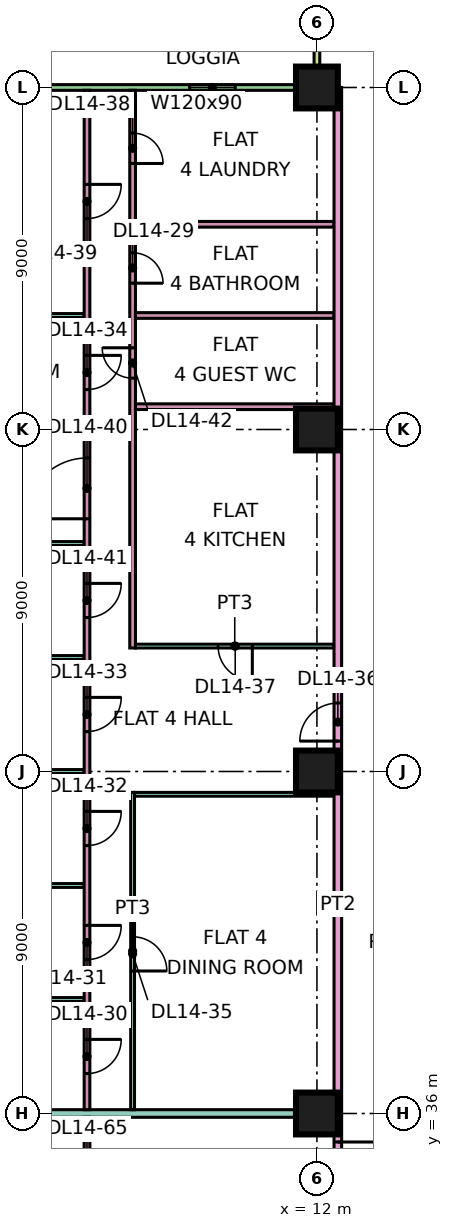
"""IFC4 building model, lengths in metres.
Left out: names, types, materials, properties, quantities, classifications, styles, units other than length and angle.
Written with IfcOpenShell. Run it as: python <this file> out.ifc"""

import sys

from ifc_helpers import new_model, si_unit, direction, frame, frame_2d, origin, origin_2d, place, context, subcontext, project, spatial, rectangle, extrude, element, fill, save


model = new_model("IFC4")
c1 = context("Model", 3, precision=1e-05, world=origin(), true_north=direction((0.0, 1.0)))
c2 = subcontext(c1, "Body", "Model", "MODEL_VIEW")
j1 = project(units=[si_unit("LENGTHUNIT", "METRE"), si_unit("PLANEANGLEUNIT", "RADIAN")], contexts=[c1])
p1 = place(None, origin())
s1 = spatial("IfcSite", under=j1, at=p1, CompositionType="ELEMENT")
p2 = place(p1, origin())
s2 = spatial("IfcBuilding", under=s1, at=p2, CompositionType="ELEMENT")
p3 = place(p2, frame((0.0, 0.0, 67.65)))
s3 = spatial("IfcBuildingStorey", under=s2, at=p3, CompositionType="ELEMENT", Elevation=67.65)
for number, where, z_axis, x_axis in (
    (1, (12.0, 36.0, 0.0), (0.0, 0.0, 1.0), (1.0, 0.0, 0.0)),
    (2, (12.0, 45.0, 0.0), (0.0, 0.0, 1.0), (1.0, 0.0, 0.0)),
    (3, (12.0, 54.0, 0.0), (0.0, 0.0, 1.0), (1.0, 0.0, 0.0)),
    (4, (12.0, 63.0, 0.0), (0.0, 0.0, 1.0), (1.0, 0.0, 0.0)),
):
    element("IfcColumn", number, at=place(p3, frame(where, z_axis=z_axis, x_axis=x_axis)), inside=s3, PredefinedType="COLUMN", context=c2, shape_type="SweptSolid", body=[
        extrude(rectangle(XDim=1.1, YDim=1.1, at=origin_2d()), origin(), (0.0, 0.0, 1.0), 3.75),
    ])
p4 = place(p3, frame((11.925, 63.0, 0.0), z_axis=(0.0, 0.0, 1.0), x_axis=(-1.0, 0.0, 0.0)))
e5 = element("IfcWall", 5, at=p4, inside=s3, PredefinedType="SOLIDWALL", context=c2, shape_type="SweptSolid", body=[
    extrude(rectangle(XDim=10.35, YDim=0.15, at=frame_2d((5.175, 0.0))), origin(), (0.0, 0.0, 1.0), 3.35),
])
p5 = place(p4, frame((2.075, 0.0, 1.7)))
e6 = element("IfcOpeningElement", 6, at=p5, cuts=e5, PredefinedType="OPENING", context=c2, shape_type="SweptSolid", body=[
    extrude(rectangle(XDim=1.2, YDim=0.9, at=frame_2d((0.6, 0.45))), frame((0.0, 0.085, 0.0), z_axis=(0.0, -1.0, 0.0), x_axis=(1.0, 0.0, 0.0)), (0.0, 0.0, 1.0), 0.17),
])
p6 = place(p4, frame((7.262, 0.0, 0.0)))
e7 = element("IfcOpeningElement", 7, at=p6, cuts=e5, PredefinedType="OPENING", context=c2, shape_type="SweptSolid", body=[
    extrude(rectangle(XDim=1.8, YDim=2.4, at=frame_2d((0.9, 1.2))), frame((0.0, 0.085, 0.0), z_axis=(0.0, -1.0, 0.0), x_axis=(1.0, 0.0, 0.0)), (0.0, 0.0, 1.0), 0.17),
])
p7 = place(p3, frame((12.0, 64.5, 0.0), z_axis=(0.0, 0.0, 1.0), x_axis=(0.0, -1.0, 0.0)))
e8 = element("IfcWall", 8, at=p7, inside=s3, PredefinedType="SOLIDWALL", context=c2, shape_type="SweptSolid", body=[
    extrude(rectangle(XDim=1.5, YDim=0.15, at=frame_2d((0.75, 0.0))), origin(), (0.0, 0.0, 1.0), 3.35),
])
for number, where, z_axis, x_axis in (
    (9, (-1.351, 39.0, 0.0), (0.0, 0.0, 1.0), (1.0, 0.0, 0.0)),
    (10, (-1.351, 42.0, 0.0), (0.0, 0.0, 1.0), (1.0, 0.0, 0.0)),
    (11, (-1.351, 45.0, 0.0), (0.0, 0.0, 1.0), (1.0, 0.0, 0.0)),
):
    element("IfcWall", number, at=place(p3, frame(where, z_axis=z_axis, x_axis=x_axis)), inside=s3, PredefinedType="PARTITIONING", context=c2, shape_type="SweptSolid", body=[
        extrude(rectangle(XDim=7.226, YDim=0.1, at=frame_2d((3.613, 0.0))), origin(), (0.0, 0.0, 1.0), 3.35),
    ])
p8 = place(p3, frame((0.0, 36.0, 0.0), z_axis=(0.0, 0.0, 1.0), x_axis=(1.0, 0.0, 0.0)))
e12 = element("IfcWall", 12, at=p8, inside=s3, PredefinedType="PARTITIONING", context=c2, shape_type="SweptSolid", body=[
    extrude(rectangle(XDim=12.45, YDim=0.2, at=frame_2d((6.225, 0.0))), origin(), (0.0, 0.0, 1.0), 3.35),
])
p9 = place(p3, frame((0.0, 48.0, 0.0), z_axis=(0.0, 0.0, 1.0), x_axis=(1.0, 0.0, 0.0)))
e13 = element("IfcWall", 13, at=p9, inside=s3, PredefinedType="PARTITIONING", context=c2, shape_type="SweptSolid", body=[
    extrude(rectangle(XDim=5.875, YDim=0.1, at=frame_2d((2.938, 0.0))), origin(), (0.0, 0.0, 1.0), 3.35),
])
for number, where, z_axis, x_axis in (
    (14, (0.074, 51.0, 0.0), (0.0, 0.0, 1.0), (1.0, 0.0, 0.0)),
    (15, (0.074, 54.0, 0.0), (0.0, 0.0, 1.0), (1.0, 0.0, 0.0)),
    (16, (0.074, 57.0, 0.0), (0.0, 0.0, 1.0), (1.0, 0.0, 0.0)),
):
    element("IfcWall", number, at=place(p3, frame(where, z_axis=z_axis, x_axis=x_axis)), inside=s3, PredefinedType="PARTITIONING", context=c2, shape_type="SweptSolid", body=[
        extrude(rectangle(XDim=5.801, YDim=0.1, at=frame_2d((2.9, 0.0))), origin(), (0.0, 0.0, 1.0), 3.35),
    ])
p10 = place(p3, frame((5.95, 29.925, 0.0), z_axis=(0.0, 0.0, 1.0), x_axis=(0.0, 1.0, 0.0)))
e17 = element("IfcWall", 17, at=p10, inside=s3, PredefinedType="PARTITIONING", context=c2, shape_type="SweptSolid", body=[
    extrude(rectangle(XDim=5.975, YDim=0.15, at=frame_2d((2.987, 0.0))), origin(), (0.0, 0.0, 1.0), 3.35),
])
p11 = place(p10, frame((4.125, 0.0, 0.0)))
e18 = element("IfcOpeningElement", 18, at=p11, cuts=e17, PredefinedType="OPENING", context=c2, shape_type="SweptSolid", body=[
    extrude(rectangle(XDim=0.9, YDim=2.1, at=frame_2d((0.45, 1.05))), frame((0.0, 0.085, 0.0), z_axis=(0.0, -1.0, 0.0), x_axis=(1.0, 0.0, 0.0)), (0.0, 0.0, 1.0), 0.17),
])
p12 = place(p3, frame((5.95, 36.1, 0.0), z_axis=(0.0, 0.0, 1.0), x_axis=(0.0, 1.0, 0.0)))
e19 = element("IfcWall", 19, at=p12, inside=s3, PredefinedType="PARTITIONING", context=c2, shape_type="SweptSolid", body=[
    extrude(rectangle(XDim=26.826, YDim=0.15, at=frame_2d((13.413, 0.0))), origin(), (0.0, 0.0, 1.0), 3.35),
])
p13 = place(p12, frame((0.95, 0.0, 0.0)))
e20 = element("IfcOpeningElement", 20, at=p13, cuts=e19, PredefinedType="OPENING", context=c2, shape_type="SweptSolid", body=[
    extrude(rectangle(XDim=0.9, YDim=2.1, at=frame_2d((0.45, 1.05))), frame((0.0, 0.085, 0.0), z_axis=(0.0, -1.0, 0.0), x_axis=(1.0, 0.0, 0.0)), (0.0, 0.0, 1.0), 0.17),
])
p14 = place(p12, frame((3.95, 0.0, 0.0)))
e21 = element("IfcOpeningElement", 21, at=p14, cuts=e19, PredefinedType="OPENING", context=c2, shape_type="SweptSolid", body=[
    extrude(rectangle(XDim=0.9, YDim=2.1, at=frame_2d((0.45, 1.05))), frame((0.0, 0.085, 0.0), z_axis=(0.0, -1.0, 0.0), x_axis=(1.0, 0.0, 0.0)), (0.0, 0.0, 1.0), 0.17),
])
p15 = place(p12, frame((6.95, 0.0, 0.0)))
e22 = element("IfcOpeningElement", 22, at=p15, cuts=e19, PredefinedType="OPENING", context=c2, shape_type="SweptSolid", body=[
    extrude(rectangle(XDim=0.9, YDim=2.1, at=frame_2d((0.45, 1.05))), frame((0.0, 0.085, 0.0), z_axis=(0.0, -1.0, 0.0), x_axis=(1.0, 0.0, 0.0)), (0.0, 0.0, 1.0), 0.17),
])
p16 = place(p12, frame((9.95, 0.0, 0.0)))
e23 = element("IfcOpeningElement", 23, at=p16, cuts=e19, PredefinedType="OPENING", context=c2, shape_type="SweptSolid", body=[
    extrude(rectangle(XDim=0.9, YDim=2.1, at=frame_2d((0.45, 1.05))), frame((0.0, 0.085, 0.0), z_axis=(0.0, -1.0, 0.0), x_axis=(1.0, 0.0, 0.0)), (0.0, 0.0, 1.0), 0.17),
])
p17 = place(p12, frame((18.95, 0.0, 0.0)))
e24 = element("IfcOpeningElement", 24, at=p17, cuts=e19, PredefinedType="OPENING", context=c2, shape_type="SweptSolid", body=[
    extrude(rectangle(XDim=0.9, YDim=2.1, at=frame_2d((0.45, 1.05))), frame((0.0, 0.085, 0.0), z_axis=(0.0, -1.0, 0.0), x_axis=(1.0, 0.0, 0.0)), (0.0, 0.0, 1.0), 0.17),
])
p18 = place(p12, frame((23.45, 0.0, 0.0)))
e25 = element("IfcOpeningElement", 25, at=p18, cuts=e19, PredefinedType="OPENING", context=c2, shape_type="SweptSolid", body=[
    extrude(rectangle(XDim=0.9, YDim=2.1, at=frame_2d((0.45, 1.05))), frame((0.0, 0.085, 0.0), z_axis=(0.0, -1.0, 0.0), x_axis=(1.0, 0.0, 0.0)), (0.0, 0.0, 1.0), 0.17),
])
p19 = place(p12, frame((15.55, 0.0, 0.0)))
e26 = element("IfcOpeningElement", 26, at=p19, cuts=e19, PredefinedType="OPENING", context=c2, shape_type="SweptSolid", body=[
    extrude(rectangle(XDim=1.6, YDim=2.1, at=frame_2d((0.8, 1.05))), frame((0.0, 0.085, 0.0), z_axis=(0.0, -1.0, 0.0), x_axis=(1.0, 0.0, 0.0)), (0.0, 0.0, 1.0), 0.17),
])
p20 = place(p12, frame((12.95, 0.0, 0.0)))
e27 = element("IfcOpeningElement", 27, at=p20, cuts=e19, PredefinedType="OPENING", context=c2, shape_type="SweptSolid", body=[
    extrude(rectangle(XDim=0.9, YDim=2.1, at=frame_2d((0.45, 1.05))), frame((0.0, 0.085, 0.0), z_axis=(0.0, -1.0, 0.0), x_axis=(1.0, 0.0, 0.0)), (0.0, 0.0, 1.0), 0.17),
])
p21 = place(p3, frame((7.15, 36.1, 0.0), z_axis=(0.0, 0.0, 1.0), x_axis=(0.0, 1.0, 0.0)))
e28 = element("IfcWall", 28, at=p21, inside=s3, PredefinedType="PARTITIONING", context=c2, shape_type="SweptSolid", body=[
    extrude(rectangle(XDim=8.35, YDim=0.1, at=frame_2d((4.175, 0.0))), origin(), (0.0, 0.0, 1.0), 3.35),
])
p22 = place(p21, frame((3.65, 0.0, 0.0)))
e29 = element("IfcOpeningElement", 29, at=p22, cuts=e28, PredefinedType="OPENING", context=c2, shape_type="SweptSolid", body=[
    extrude(rectangle(XDim=0.9, YDim=2.1, at=frame_2d((0.45, 1.05))), frame((0.0, 0.06, 0.0), z_axis=(0.0, -1.0, 0.0), x_axis=(1.0, 0.0, 0.0)), (0.0, 0.0, 1.0), 0.12),
])
p23 = place(p3, frame((7.15, 48.25, 0.0), z_axis=(0.0, 0.0, 1.0), x_axis=(0.0, 1.0, 0.0)))
e30 = element("IfcWall", 30, at=p23, inside=s3, PredefinedType="PARTITIONING", context=c2, shape_type="SweptSolid", body=[
    extrude(rectangle(XDim=14.676, YDim=0.15, at=frame_2d((7.338, 0.0))), origin(), (0.0, 0.0, 1.0), 3.35),
])
p24 = place(p23, frame((9.6, 0.0, 0.0)))
e31 = element("IfcOpeningElement", 31, at=p24, cuts=e30, PredefinedType="OPENING", context=c2, shape_type="SweptSolid", body=[
    extrude(rectangle(XDim=0.8, YDim=2.1, at=frame_2d((0.4, 1.05))), frame((0.0, 0.085, 0.0), z_axis=(0.0, -1.0, 0.0), x_axis=(1.0, 0.0, 0.0)), (0.0, 0.0, 1.0), 0.17),
])
p25 = place(p23, frame((12.75, 0.0, 0.0)))
e32 = element("IfcOpeningElement", 32, at=p25, cuts=e30, PredefinedType="OPENING", context=c2, shape_type="SweptSolid", body=[
    extrude(rectangle(XDim=0.8, YDim=2.1, at=frame_2d((0.4, 1.05))), frame((0.0, 0.085, 0.0), z_axis=(0.0, -1.0, 0.0), x_axis=(1.0, 0.0, 0.0)), (0.0, 0.0, 1.0), 0.17),
])
p26 = place(p23, frame((7.1, 0.0, 0.0)))
e33 = element("IfcOpeningElement", 33, at=p26, cuts=e30, PredefinedType="OPENING", context=c2, shape_type="SweptSolid", body=[
    extrude(rectangle(XDim=0.8, YDim=2.1, at=frame_2d((0.4, 1.05))), frame((0.0, 0.085, 0.0), z_axis=(0.0, -1.0, 0.0), x_axis=(1.0, 0.0, 0.0)), (0.0, 0.0, 1.0), 0.17),
])
p27 = place(p3, frame((7.2, 44.4, 0.0), z_axis=(0.0, 0.0, 1.0), x_axis=(1.0, 0.0, 0.0)))
e34 = element("IfcWall", 34, at=p27, inside=s3, PredefinedType="PARTITIONING", context=c2, shape_type="SweptSolid", body=[
    extrude(rectangle(XDim=5.25, YDim=0.1, at=frame_2d((2.625, 0.0))), origin(), (0.0, 0.0, 1.0), 3.35),
])
p28 = place(p3, frame((7.225, 48.3, 0.0), z_axis=(0.0, 0.0, 1.0), x_axis=(1.0, 0.0, 0.0)))
e35 = element("IfcWall", 35, at=p28, inside=s3, PredefinedType="PARTITIONING", context=c2, shape_type="SweptSolid", body=[
    extrude(rectangle(XDim=5.225, YDim=0.1, at=frame_2d((2.612, 0.0))), origin(), (0.0, 0.0, 1.0), 3.35),
])
p29 = place(p28, frame((2.175, 0.0, 0.0)))
e36 = element("IfcOpeningElement", 36, at=p29, cuts=e35, PredefinedType="OPENING", context=c2, shape_type="SweptSolid", body=[
    extrude(rectangle(XDim=0.9, YDim=2.1, at=frame_2d((0.45, 1.05))), frame((0.0, 0.06, 0.0), z_axis=(0.0, -1.0, 0.0), x_axis=(1.0, 0.0, 0.0)), (0.0, 0.0, 1.0), 0.12),
])
for number, where, z_axis, x_axis in (
    (37, (7.225, 54.6, 0.0), (0.0, 0.0, 1.0), (1.0, 0.0, 0.0)),
    (38, (7.225, 57.0, 0.0), (0.0, 0.0, 1.0), (1.0, 0.0, 0.0)),
    (39, (7.225, 59.4, 0.0), (0.0, 0.0, 1.0), (1.0, 0.0, 0.0)),
):
    element("IfcWall", number, at=place(p3, frame(where, z_axis=z_axis, x_axis=x_axis)), inside=s3, PredefinedType="PARTITIONING", context=c2, shape_type="SweptSolid", body=[
        extrude(rectangle(XDim=5.225, YDim=0.15, at=frame_2d((2.612, 0.0))), origin(), (0.0, 0.0, 1.0), 3.35),
    ])
p30 = place(p3, frame((12.55, 20.0, 0.0), z_axis=(0.0, 0.0, 1.0), x_axis=(0.0, 1.0, 0.0)))
e40 = element("IfcWall", 40, at=p30, inside=s3, PredefinedType="PARTITIONING", context=c2, shape_type="SweptSolid", body=[
    extrude(rectangle(XDim=43.0, YDim=0.2, at=frame_2d((21.5, 0.0))), origin(), (0.0, 0.0, 1.0), 3.35),
])
p31 = place(p30, frame((25.8, 0.0, 0.0)))
e41 = element("IfcOpeningElement", 41, at=p31, cuts=e40, PredefinedType="OPENING", context=c2, shape_type="SweptSolid", body=[
    extrude(rectangle(XDim=1.0, YDim=2.1, at=frame_2d((0.5, 1.05))), frame((0.0, 0.11, 0.0), z_axis=(0.0, -1.0, 0.0), x_axis=(1.0, 0.0, 0.0)), (0.0, 0.0, 1.0), 0.22),
])
p32 = place(p30, frame((0.6, 0.0, 0.0)))
e42 = element("IfcOpeningElement", 42, at=p32, cuts=e40, PredefinedType="OPENING", context=c2, shape_type="SweptSolid", body=[
    extrude(rectangle(XDim=1.2, YDim=2.1, at=frame_2d((0.6, 1.05))), frame((0.0, 0.11, 0.0), z_axis=(0.0, -1.0, 0.0), x_axis=(1.0, 0.0, 0.0)), (0.0, 0.0, 1.0), 0.22),
])
p33 = place(p30, frame((14.25, 0.0, 0.0)))
e43 = element("IfcOpeningElement", 43, at=p33, cuts=e40, PredefinedType="OPENING", context=c2, shape_type="SweptSolid", body=[
    extrude(rectangle(XDim=1.0, YDim=2.1, at=frame_2d((0.5, 1.05))), frame((0.0, 0.11, 0.0), z_axis=(0.0, -1.0, 0.0), x_axis=(1.0, 0.0, 0.0)), (0.0, 0.0, 1.0), 0.22),
])
p34 = place(p5, origin())
e44 = element("IfcWindow", 44, at=p34, inside=s3, PartitioningType="SINGLE_PANEL", PredefinedType="WINDOW", context=c2, shape_type="SweptSolid", body=[
    extrude(rectangle(XDim=1.2, YDim=0.9, at=frame_2d((0.6, 0.45))), frame((0.0, 0.03, 0.0), z_axis=(0.0, -1.0, 0.0), x_axis=(1.0, 0.0, 0.0)), (0.0, 0.0, 1.0), 0.06),
])
fill(e6, e44)
p35 = place(p24, frame((0.8, 0.0, 0.0), z_axis=(0.0, 0.0, 1.0), x_axis=(-1.0, 0.0, 0.0)))
e45 = element("IfcDoor", 45, at=p35, inside=s3, OperationType="SINGLE_SWING_LEFT", PredefinedType="DOOR", context=c2, shape_type="SweptSolid", body=[
    extrude(rectangle(XDim=0.8, YDim=2.1, at=frame_2d((0.4, 1.05))), frame((0.0, 0.025, 0.0), z_axis=(0.0, -1.0, 0.0), x_axis=(1.0, 0.0, 0.0)), (0.0, 0.0, 1.0), 0.05),
])
fill(e31, e45)
p36 = place(p13, origin())
e46 = element("IfcDoor", 46, at=p36, inside=s3, OperationType="SINGLE_SWING_RIGHT", PredefinedType="DOOR", context=c2, shape_type="SweptSolid", body=[
    extrude(rectangle(XDim=0.9, YDim=2.1, at=frame_2d((0.45, 1.05))), frame((0.0, 0.025, 0.0), z_axis=(0.0, -1.0, 0.0), x_axis=(1.0, 0.0, 0.0)), (0.0, 0.0, 1.0), 0.05),
])
fill(e20, e46)
p37 = place(p14, origin())
e47 = element("IfcDoor", 47, at=p37, inside=s3, OperationType="SINGLE_SWING_RIGHT", PredefinedType="DOOR", context=c2, shape_type="SweptSolid", body=[
    extrude(rectangle(XDim=0.9, YDim=2.1, at=frame_2d((0.45, 1.05))), frame((0.0, 0.025, 0.0), z_axis=(0.0, -1.0, 0.0), x_axis=(1.0, 0.0, 0.0)), (0.0, 0.0, 1.0), 0.05),
])
fill(e21, e47)
p38 = place(p15, origin())
e48 = element("IfcDoor", 48, at=p38, inside=s3, OperationType="SINGLE_SWING_RIGHT", PredefinedType="DOOR", context=c2, shape_type="SweptSolid", body=[
    extrude(rectangle(XDim=0.9, YDim=2.1, at=frame_2d((0.45, 1.05))), frame((0.0, 0.025, 0.0), z_axis=(0.0, -1.0, 0.0), x_axis=(1.0, 0.0, 0.0)), (0.0, 0.0, 1.0), 0.05),
])
fill(e22, e48)
p39 = place(p16, origin())
e49 = element("IfcDoor", 49, at=p39, inside=s3, OperationType="SINGLE_SWING_RIGHT", PredefinedType="DOOR", context=c2, shape_type="SweptSolid", body=[
    extrude(rectangle(XDim=0.9, YDim=2.1, at=frame_2d((0.45, 1.05))), frame((0.0, 0.025, 0.0), z_axis=(0.0, -1.0, 0.0), x_axis=(1.0, 0.0, 0.0)), (0.0, 0.0, 1.0), 0.05),
])
fill(e23, e49)
p40 = place(p17, origin())
e50 = element("IfcDoor", 50, at=p40, inside=s3, OperationType="SINGLE_SWING_RIGHT", PredefinedType="DOOR", context=c2, shape_type="SweptSolid", body=[
    extrude(rectangle(XDim=0.9, YDim=2.1, at=frame_2d((0.45, 1.05))), frame((0.0, 0.025, 0.0), z_axis=(0.0, -1.0, 0.0), x_axis=(1.0, 0.0, 0.0)), (0.0, 0.0, 1.0), 0.05),
])
fill(e24, e50)
p41 = place(p22, frame((0.9, 0.0, 0.0), z_axis=(0.0, 0.0, 1.0), x_axis=(-1.0, 0.0, 0.0)))
e51 = element("IfcDoor", 51, at=p41, inside=s3, OperationType="SINGLE_SWING_LEFT", PredefinedType="DOOR", context=c2, shape_type="SweptSolid", body=[
    extrude(rectangle(XDim=0.9, YDim=2.1, at=frame_2d((0.45, 1.05))), frame((0.0, 0.025, 0.0), z_axis=(0.0, -1.0, 0.0), x_axis=(1.0, 0.0, 0.0)), (0.0, 0.0, 1.0), 0.05),
])
fill(e29, e51)
p42 = place(p31, origin())
e52 = element("IfcDoor", 52, at=p42, inside=s3, OperationType="SINGLE_SWING_LEFT", PredefinedType="DOOR", context=c2, shape_type="SweptSolid", body=[
    extrude(rectangle(XDim=1.0, YDim=2.1, at=frame_2d((0.5, 1.05))), frame((0.0, 0.025, 0.0), z_axis=(0.0, -1.0, 0.0), x_axis=(1.0, 0.0, 0.0)), (0.0, 0.0, 1.0), 0.05),
])
fill(e41, e52)
p43 = place(p29, origin())
e53 = element("IfcDoor", 53, at=p43, inside=s3, OperationType="SINGLE_SWING_RIGHT", PredefinedType="DOOR", context=c2, shape_type="SweptSolid", body=[
    extrude(rectangle(XDim=0.9, YDim=2.1, at=frame_2d((0.45, 1.05))), frame((0.0, 0.025, 0.0), z_axis=(0.0, -1.0, 0.0), x_axis=(1.0, 0.0, 0.0)), (0.0, 0.0, 1.0), 0.05),
])
fill(e36, e53)
p44 = place(p25, frame((0.8, 0.0, 0.0), z_axis=(0.0, 0.0, 1.0), x_axis=(-1.0, 0.0, 0.0)))
e54 = element("IfcDoor", 54, at=p44, inside=s3, OperationType="SINGLE_SWING_LEFT", PredefinedType="DOOR", context=c2, shape_type="SweptSolid", body=[
    extrude(rectangle(XDim=0.8, YDim=2.1, at=frame_2d((0.4, 1.05))), frame((0.0, 0.025, 0.0), z_axis=(0.0, -1.0, 0.0), x_axis=(1.0, 0.0, 0.0)), (0.0, 0.0, 1.0), 0.05),
])
fill(e32, e54)
p45 = place(p18, origin())
e55 = element("IfcDoor", 55, at=p45, inside=s3, OperationType="SINGLE_SWING_RIGHT", PredefinedType="DOOR", context=c2, shape_type="SweptSolid", body=[
    extrude(rectangle(XDim=0.9, YDim=2.1, at=frame_2d((0.45, 1.05))), frame((0.0, 0.025, 0.0), z_axis=(0.0, -1.0, 0.0), x_axis=(1.0, 0.0, 0.0)), (0.0, 0.0, 1.0), 0.05),
])
fill(e25, e55)
p46 = place(p19, origin())
e56 = element("IfcDoor", 56, at=p46, inside=s3, OperationType="DOUBLE_DOOR_SINGLE_SWING", PredefinedType="DOOR", context=c2, shape_type="SweptSolid", body=[
    extrude(rectangle(XDim=1.6, YDim=2.1, at=frame_2d((0.8, 1.05))), frame((0.0, 0.025, 0.0), z_axis=(0.0, -1.0, 0.0), x_axis=(1.0, 0.0, 0.0)), (0.0, 0.0, 1.0), 0.05),
])
fill(e26, e56)
p47 = place(p20, origin())
e57 = element("IfcDoor", 57, at=p47, inside=s3, OperationType="SINGLE_SWING_RIGHT", PredefinedType="DOOR", context=c2, shape_type="SweptSolid", body=[
    extrude(rectangle(XDim=0.9, YDim=2.1, at=frame_2d((0.45, 1.05))), frame((0.0, 0.025, 0.0), z_axis=(0.0, -1.0, 0.0), x_axis=(1.0, 0.0, 0.0)), (0.0, 0.0, 1.0), 0.05),
])
fill(e27, e57)
p48 = place(p26, frame((0.8, 0.0, 0.0), z_axis=(0.0, 0.0, 1.0), x_axis=(-1.0, 0.0, 0.0)))
e58 = element("IfcDoor", 58, at=p48, inside=s3, OperationType="SINGLE_SWING_RIGHT", PredefinedType="DOOR", context=c2, shape_type="SweptSolid", body=[
    extrude(rectangle(XDim=0.8, YDim=2.1, at=frame_2d((0.4, 1.05))), frame((0.0, 0.025, 0.0), z_axis=(0.0, -1.0, 0.0), x_axis=(1.0, 0.0, 0.0)), (0.0, 0.0, 1.0), 0.05),
])
fill(e33, e58)
p49 = place(p33, origin())
e59 = element("IfcDoor", 59, at=p49, inside=s3, OperationType="SINGLE_SWING_RIGHT", PredefinedType="DOOR", context=c2, shape_type="SweptSolid", body=[
    extrude(rectangle(XDim=1.0, YDim=2.1, at=frame_2d((0.5, 1.05))), frame((0.0, 0.025, 0.0), z_axis=(0.0, -1.0, 0.0), x_axis=(1.0, 0.0, 0.0)), (0.0, 0.0, 1.0), 0.05),
])
fill(e43, e59)
save(model, sys.argv[1])
